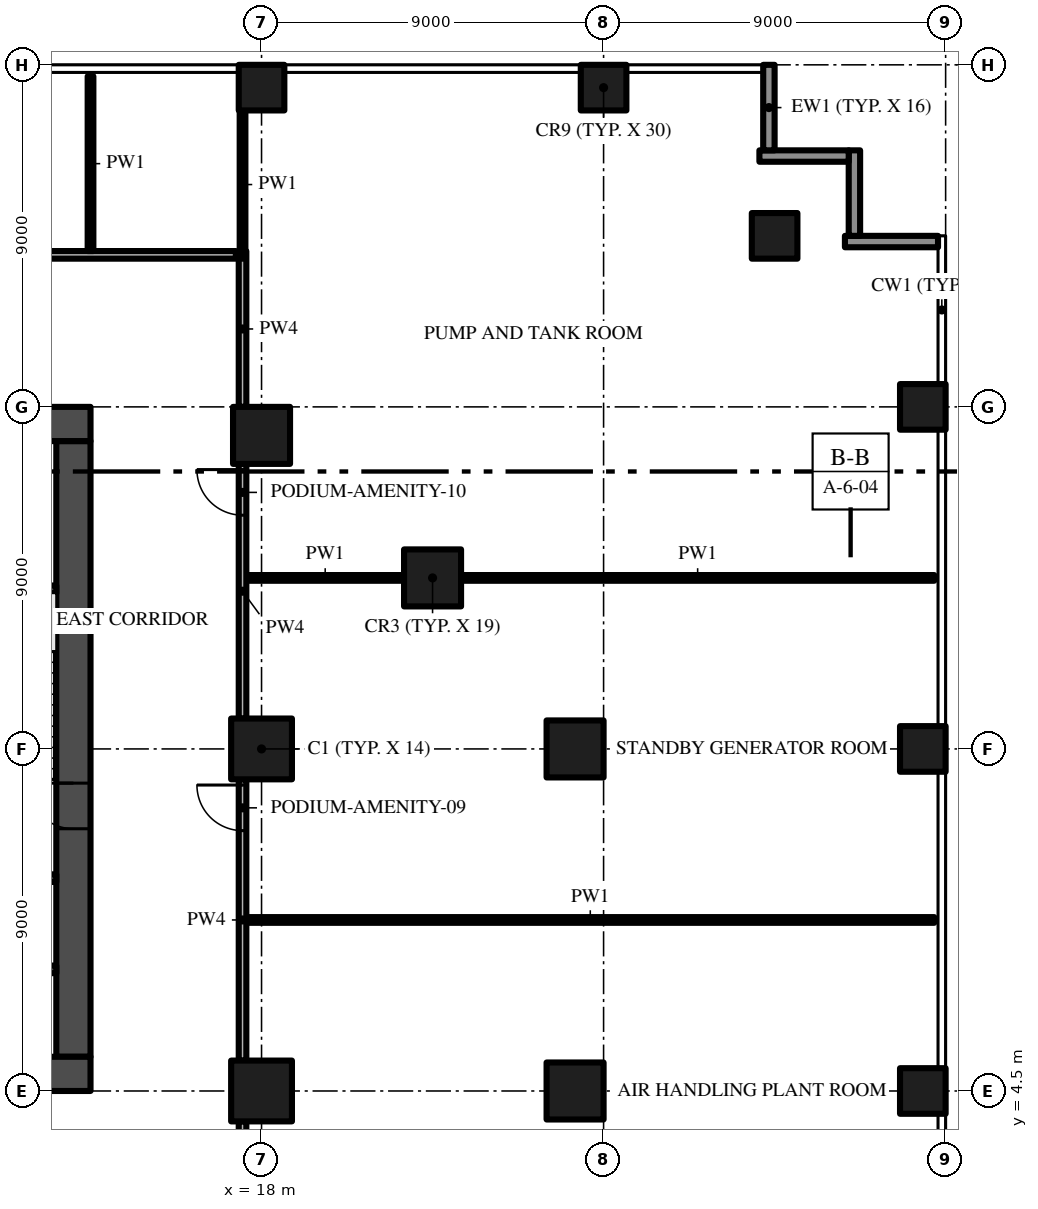
"""IFC4 building model, lengths in metres.
Left out: names, types, materials, properties, quantities, classifications, styles, units other than length and angle.
Written with IfcOpenShell. Run it as: python <this file> out.ifc"""

import sys

from ifc_helpers import new_model, si_unit, direction, frame, frame_2d, origin, origin_2d, place, context, subcontext, project, spatial, rectangle, extrude, element, fill, save


model = new_model("IFC4")
c1 = context("Model", 3, precision=1e-05, world=origin(), true_north=direction((0.0, 1.0)))
c2 = subcontext(c1, "Body", "Model", "MODEL_VIEW")
j1 = project(units=[si_unit("LENGTHUNIT", "METRE"), si_unit("PLANEANGLEUNIT", "RADIAN")], contexts=[c1])
p1 = place(None, origin())
s1 = spatial("IfcSite", under=j1, at=p1, CompositionType="ELEMENT")
p2 = place(p1, origin())
s2 = spatial("IfcBuilding", under=s1, at=p2, CompositionType="ELEMENT")
p3 = place(p2, frame((0.0, 0.0, 6.0)))
s3 = spatial("IfcBuildingStorey", under=s2, at=p3, CompositionType="ELEMENT", Elevation=6.0)
p4 = place(p3, frame((-13.5, 4.95, -0.4), z_axis=(0.0, 0.0, 1.0), x_axis=(1.0, 0.0, 0.0)))
e1 = element("IfcWall", 1, at=p4, inside=s3, PredefinedType="SHEAR", context=c2, shape_type="SweptSolid", body=[
    extrude(rectangle(XDim=27.0, YDim=0.9, at=frame_2d((13.5, 0.0))), origin(), (0.0, 0.0, 1.0), 4.55),
])
p5 = place(p4, frame((12.0, 0.0, 0.4)))
e2 = element("IfcOpeningElement", 2, at=p5, cuts=e1, PredefinedType="OPENING", context=c2, shape_type="SweptSolid", body=[
    extrude(rectangle(XDim=3.0, YDim=2.4, at=frame_2d((1.5, 1.2))), frame((0.0, 0.46, 0.0), z_axis=(0.0, -1.0, 0.0), x_axis=(1.0, 0.0, 0.0)), (0.0, 0.0, 1.0), 0.92),
])
p6 = place(p4, frame((4.9, 0.0, 0.4)))
e3 = element("IfcOpeningElement", 3, at=p6, cuts=e1, PredefinedType="OPENING", context=c2, shape_type="SweptSolid", body=[
    extrude(rectangle(XDim=1.2, YDim=2.2, at=frame_2d((0.6, 1.1))), frame((0.0, 0.46, 0.0), z_axis=(0.0, -1.0, 0.0), x_axis=(1.0, 0.0, 0.0)), (0.0, 0.0, 1.0), 0.92),
])
p7 = place(p4, frame((20.75, 0.0, 0.4)))
e4 = element("IfcOpeningElement", 4, at=p7, cuts=e1, PredefinedType="OPENING", context=c2, shape_type="SweptSolid", body=[
    extrude(rectangle(XDim=1.5, YDim=2.2, at=frame_2d((0.75, 1.1))), frame((0.0, 0.46, 0.0), z_axis=(0.0, -1.0, 0.0), x_axis=(1.0, 0.0, 0.0)), (0.0, 0.0, 1.0), 0.92),
])
p8 = place(p4, frame((17.4, 0.0, 0.4)))
e5 = element("IfcOpeningElement", 5, at=p8, cuts=e1, PredefinedType="OPENING", context=c2, shape_type="SweptSolid", body=[
    extrude(rectangle(XDim=1.2, YDim=2.2, at=frame_2d((0.6, 1.1))), frame((0.0, 0.46, 0.0), z_axis=(0.0, -1.0, 0.0), x_axis=(1.0, 0.0, 0.0)), (0.0, 0.0, 1.0), 0.92),
])
p9 = place(p3, frame((13.05, 5.4, -0.4), z_axis=(0.0, 0.0, 1.0), x_axis=(0.0, 1.0, 0.0)))
e6 = element("IfcWall", 6, at=p9, inside=s3, PredefinedType="SHEAR", context=c2, shape_type="SweptSolid", body=[
    extrude(rectangle(XDim=16.2, YDim=0.9, at=frame_2d((8.1, 0.0))), origin(), (0.0, 0.0, 1.0), 4.55),
])
p10 = place(p9, frame((6.0, 0.0, 0.4)))
e7 = element("IfcOpeningElement", 7, at=p10, cuts=e6, PredefinedType="OPENING", context=c2, shape_type="SweptSolid", body=[
    extrude(rectangle(XDim=1.2, YDim=2.2, at=frame_2d((0.6, 1.1))), frame((0.0, 0.46, 0.0), z_axis=(0.0, -1.0, 0.0), x_axis=(1.0, 0.0, 0.0)), (0.0, 0.0, 1.0), 0.92),
])
p11 = place(p3, frame((13.5, 22.05, -0.4), z_axis=(0.0, 0.0, 1.0), x_axis=(-1.0, 0.0, 0.0)))
e8 = element("IfcWall", 8, at=p11, inside=s3, PredefinedType="SHEAR", context=c2, shape_type="SweptSolid", body=[
    extrude(rectangle(XDim=27.0, YDim=0.9, at=frame_2d((13.5, 0.0))), origin(), (0.0, 0.0, 1.0), 4.55),
])
for number, where, z_axis, x_axis in (
    (9, (18.0, 30.9, 0.0), (0.0, 0.0, 1.0), (1.0, 0.0, 0.0)),
    (10, (27.0, 30.9, 0.0), (0.0, 0.0, 1.0), (1.0, 0.0, 0.0)),
    (11, (35.4, 13.5, 0.0), (0.0, 0.0, 1.0), (1.0, 0.0, 0.0)),
    (12, (35.4, 22.5, 0.0), (0.0, 0.0, 1.0), (1.0, 0.0, 0.0)),
    (13, (31.5, 27.0, 0.0), (0.0, 0.0, 1.0), (1.0, 0.0, 0.0)),
    (14, (35.4, 4.5, 0.0), (0.0, 0.0, 1.0), (1.0, 0.0, 0.0)),
):
    element("IfcColumn", number, at=place(p3, frame(where, z_axis=z_axis, x_axis=x_axis)), inside=s3, PredefinedType="COLUMN", context=c2, shape_type="SweptSolid", body=[
        extrude(rectangle(XDim=1.2, YDim=1.2, at=origin_2d()), origin(), (0.0, 0.0, 1.0), 4.15),
    ])
p12 = place(p3, frame((18.0, 13.5, 0.0), z_axis=(0.0, 0.0, 1.0), x_axis=(1.0, 0.0, 0.0)))
e15 = element("IfcColumn", 15, at=p12, inside=s3, PredefinedType="COLUMN", context=c2, shape_type="SweptSolid", body=[
    extrude(rectangle(XDim=1.6, YDim=1.6, at=origin_2d()), origin(), (0.0, 0.0, 1.0), 4.15),
])
p13 = place(p3, frame((18.0, 21.75, 0.0), z_axis=(0.0, 0.0, 1.0), x_axis=(1.0, 0.0, 0.0)))
e16 = element("IfcColumn", 16, at=p13, inside=s3, PredefinedType="COLUMN", context=c2, shape_type="SweptSolid", body=[
    extrude(rectangle(XDim=1.5, YDim=1.5, at=origin_2d()), origin(), (0.0, 0.0, 1.0), 4.15),
])
p14 = place(p3, frame((18.0, 4.5, 0.0), z_axis=(0.0, 0.0, 1.0), x_axis=(1.0, 0.0, 0.0)))
e17 = element("IfcColumn", 17, at=p14, inside=s3, PredefinedType="COLUMN", context=c2, shape_type="SweptSolid", body=[
    extrude(rectangle(XDim=1.6, YDim=1.6, at=origin_2d()), origin(), (0.0, 0.0, 1.0), 4.15),
])
for number, where, z_axis, x_axis in (
    (18, (26.25, 13.5, 0.0), (0.0, 0.0, 1.0), (1.0, 0.0, 0.0)),
    (19, (22.5, 18.0, 0.0), (0.0, 0.0, 1.0), (1.0, 0.0, 0.0)),
    (20, (26.25, 4.5, 0.0), (0.0, 0.0, 1.0), (1.0, 0.0, 0.0)),
):
    element("IfcColumn", number, at=place(p3, frame(where, z_axis=z_axis, x_axis=x_axis)), inside=s3, PredefinedType="COLUMN", context=c2, shape_type="SweptSolid", body=[
        extrude(rectangle(XDim=1.5, YDim=1.5, at=origin_2d()), origin(), (0.0, 0.0, 1.0), 4.15),
    ])
p15 = place(p3, frame((33.35, 26.85, 0.0), z_axis=(0.0, 0.0, 1.0), x_axis=(1.0, 0.0, 0.0)))
e21 = element("IfcWall", 21, at=p15, inside=s3, PredefinedType="SOLIDWALL", context=c2, shape_type="SweptSolid", body=[
    extrude(rectangle(XDim=2.45, YDim=0.3, at=frame_2d((1.225, 0.0))), origin(), (0.0, 0.0, 1.0), 4.15),
])
p16 = place(p3, frame((33.6, 29.25, 0.0), z_axis=(0.0, 0.0, 1.0), x_axis=(0.0, -1.0, 0.0)))
e22 = element("IfcWall", 22, at=p16, inside=s3, PredefinedType="SOLIDWALL", context=c2, shape_type="SweptSolid", body=[
    extrude(rectangle(XDim=2.25, YDim=0.3, at=frame_2d((1.125, 0.0))), origin(), (0.0, 0.0, 1.0), 4.15),
])
p17 = place(p3, frame((31.1, 29.1, 0.0), z_axis=(0.0, 0.0, 1.0), x_axis=(1.0, 0.0, 0.0)))
e23 = element("IfcWall", 23, at=p17, inside=s3, PredefinedType="SOLIDWALL", context=c2, shape_type="SweptSolid", body=[
    extrude(rectangle(XDim=2.35, YDim=0.3, at=frame_2d((1.175, 0.0))), origin(), (0.0, 0.0, 1.0), 4.15),
])
p18 = place(p3, frame((31.35, 31.5, 0.0), z_axis=(0.0, 0.0, 1.0), x_axis=(0.0, -1.0, 0.0)))
e24 = element("IfcWall", 24, at=p18, inside=s3, PredefinedType="SOLIDWALL", context=c2, shape_type="SweptSolid", body=[
    extrude(rectangle(XDim=2.25, YDim=0.3, at=frame_2d((1.125, 0.0))), origin(), (0.0, 0.0, 1.0), 4.15),
])
for number, where, z_axis, x_axis in (
    (25, (9.65, 7.7, 0.0), (0.0, 0.0, 1.0), (1.0, 0.0, 0.0)),
    (26, (9.65, 10.1, 0.0), (0.0, 0.0, 1.0), (1.0, 0.0, 0.0)),
    (27, (9.65, 17.7, 0.0), (0.0, 0.0, 1.0), (1.0, 0.0, 0.0)),
):
    element("IfcWall", number, at=place(p3, frame(where, z_axis=z_axis, x_axis=x_axis)), inside=s3, PredefinedType="SHEAR", context=c2, shape_type="SweptSolid", body=[
        extrude(rectangle(XDim=2.95, YDim=0.2, at=frame_2d((1.475, 0.0))), origin(), (0.0, 0.0, 1.0), 4.15),
    ])
p19 = place(p3, frame((17.6, 9.0, 0.0), z_axis=(0.0, 0.0, 1.0), x_axis=(1.0, 0.0, 0.0)))
e28 = element("IfcWall", 28, at=p19, inside=s3, PredefinedType="PARTITIONING", context=c2, shape_type="SweptSolid", body=[
    extrude(rectangle(XDim=18.1, YDim=0.15, at=frame_2d((9.05, 0.0))), origin(), (0.0, 0.0, 1.0), 4.15),
])
p20 = place(p3, frame((17.6, 18.0, 0.0), z_axis=(0.0, 0.0, 1.0), x_axis=(1.0, 0.0, 0.0)))
e29 = element("IfcWall", 29, at=p20, inside=s3, PredefinedType="PARTITIONING", context=c2, shape_type="SweptSolid", body=[
    extrude(rectangle(XDim=4.15, YDim=0.15, at=frame_2d((2.075, 0.0))), origin(), (0.0, 0.0, 1.0), 4.15),
])
p21 = place(p3, frame((23.25, 18.0, 0.0), z_axis=(0.0, 0.0, 1.0), x_axis=(1.0, 0.0, 0.0)))
e30 = element("IfcWall", 30, at=p21, inside=s3, PredefinedType="PARTITIONING", context=c2, shape_type="SweptSolid", body=[
    extrude(rectangle(XDim=12.45, YDim=0.15, at=frame_2d((6.225, 0.0))), origin(), (0.0, 0.0, 1.0), 4.15),
])
p22 = place(p3, frame((-17.325, 26.5, 0.0), z_axis=(0.0, 0.0, 1.0), x_axis=(1.0, 0.0, 0.0)))
e31 = element("IfcWall", 31, at=p22, inside=s3, PredefinedType="PARTITIONING", context=c2, shape_type="SweptSolid", body=[
    extrude(rectangle(XDim=34.65, YDim=0.2, at=frame_2d((17.325, 0.0))), origin(), (0.0, 0.0, 1.0), 4.15),
])
p23 = place(p22, frame((5.625, 0.0, 0.0)))
e32 = element("IfcOpeningElement", 32, at=p23, cuts=e31, PredefinedType="OPENING", context=c2, shape_type="SweptSolid", body=[
    extrude(rectangle(XDim=0.9, YDim=2.1, at=frame_2d((0.45, 1.05))), frame((0.0, 0.11, 0.0), z_axis=(0.0, -1.0, 0.0), x_axis=(1.0, 0.0, 0.0)), (0.0, 0.0, 1.0), 0.22),
])
p24 = place(p22, frame((10.125, 0.0, 0.0)))
e33 = element("IfcOpeningElement", 33, at=p24, cuts=e31, PredefinedType="OPENING", context=c2, shape_type="SweptSolid", body=[
    extrude(rectangle(XDim=0.9, YDim=2.1, at=frame_2d((0.45, 1.05))), frame((0.0, 0.11, 0.0), z_axis=(0.0, -1.0, 0.0), x_axis=(1.0, 0.0, 0.0)), (0.0, 0.0, 1.0), 0.22),
])
p25 = place(p22, frame((14.625, 0.0, 0.0)))
e34 = element("IfcOpeningElement", 34, at=p25, cuts=e31, PredefinedType="OPENING", context=c2, shape_type="SweptSolid", body=[
    extrude(rectangle(XDim=0.9, YDim=2.1, at=frame_2d((0.45, 1.05))), frame((0.0, 0.11, 0.0), z_axis=(0.0, -1.0, 0.0), x_axis=(1.0, 0.0, 0.0)), (0.0, 0.0, 1.0), 0.22),
])
p26 = place(p22, frame((23.625, 0.0, 0.0)))
e35 = element("IfcOpeningElement", 35, at=p26, cuts=e31, PredefinedType="OPENING", context=c2, shape_type="SweptSolid", body=[
    extrude(rectangle(XDim=0.9, YDim=2.1, at=frame_2d((0.45, 1.05))), frame((0.0, 0.11, 0.0), z_axis=(0.0, -1.0, 0.0), x_axis=(1.0, 0.0, 0.0)), (0.0, 0.0, 1.0), 0.22),
])
p27 = place(p3, frame((13.5, 26.6, 0.0), z_axis=(0.0, 0.0, 1.0), x_axis=(0.0, 1.0, 0.0)))
e36 = element("IfcWall", 36, at=p27, inside=s3, PredefinedType="PARTITIONING", context=c2, shape_type="SweptSolid", body=[
    extrude(rectangle(XDim=4.6, YDim=0.15, at=frame_2d((2.3, 0.0))), origin(), (0.0, 0.0, 1.0), 4.15),
])
p28 = place(p3, frame((17.5, -0.175, 0.0), z_axis=(0.0, 0.0, 1.0), x_axis=(0.0, 1.0, 0.0)))
e37 = element("IfcWall", 37, at=p28, inside=s3, PredefinedType="PARTITIONING", context=c2, shape_type="SweptSolid", body=[
    extrude(rectangle(XDim=3.875, YDim=0.2, at=frame_2d((1.938, 0.0))), origin(), (0.0, 0.0, 1.0), 4.15),
])
p29 = place(p28, frame((1.825, 0.0, 0.0)))
e38 = element("IfcOpeningElement", 38, at=p29, cuts=e37, PredefinedType="OPENING", context=c2, shape_type="SweptSolid", body=[
    extrude(rectangle(XDim=1.2, YDim=2.4, at=frame_2d((0.6, 1.2))), frame((0.0, 0.11, 0.0), z_axis=(0.0, -1.0, 0.0), x_axis=(1.0, 0.0, 0.0)), (0.0, 0.0, 1.0), 0.22),
])
p30 = place(p3, frame((17.5, 5.3, 0.0), z_axis=(0.0, 0.0, 1.0), x_axis=(0.0, 1.0, 0.0)))
e39 = element("IfcWall", 39, at=p30, inside=s3, PredefinedType="PARTITIONING", context=c2, shape_type="SweptSolid", body=[
    extrude(rectangle(XDim=7.4, YDim=0.2, at=frame_2d((3.7, 0.0))), origin(), (0.0, 0.0, 1.0), 4.15),
])
p31 = place(p30, frame((6.05, 0.0, 0.0)))
e40 = element("IfcOpeningElement", 40, at=p31, cuts=e39, PredefinedType="OPENING", context=c2, shape_type="SweptSolid", body=[
    extrude(rectangle(XDim=1.2, YDim=2.4, at=frame_2d((0.6, 1.2))), frame((0.0, 0.11, 0.0), z_axis=(0.0, -1.0, 0.0), x_axis=(1.0, 0.0, 0.0)), (0.0, 0.0, 1.0), 0.22),
])
p32 = place(p3, frame((17.5, 14.3, 0.0), z_axis=(0.0, 0.0, 1.0), x_axis=(0.0, 1.0, 0.0)))
e41 = element("IfcWall", 41, at=p32, inside=s3, PredefinedType="PARTITIONING", context=c2, shape_type="SweptSolid", body=[
    extrude(rectangle(XDim=6.7, YDim=0.2, at=frame_2d((3.35, 0.0))), origin(), (0.0, 0.0, 1.0), 4.15),
])
p33 = place(p32, frame((5.35, 0.0, 0.0)))
e42 = element("IfcOpeningElement", 42, at=p33, cuts=e41, PredefinedType="OPENING", context=c2, shape_type="SweptSolid", body=[
    extrude(rectangle(XDim=1.2, YDim=2.4, at=frame_2d((0.6, 1.2))), frame((0.0, 0.11, 0.0), z_axis=(0.0, -1.0, 0.0), x_axis=(1.0, 0.0, 0.0)), (0.0, 0.0, 1.0), 0.22),
])
p34 = place(p3, frame((17.5, 22.5, 0.0), z_axis=(0.0, 0.0, 1.0), x_axis=(0.0, 1.0, 0.0)))
e43 = element("IfcWall", 43, at=p34, inside=s3, PredefinedType="PARTITIONING", context=c2, shape_type="SweptSolid", body=[
    extrude(rectangle(XDim=4.1, YDim=0.2, at=frame_2d((2.05, 0.0))), origin(), (0.0, 0.0, 1.0), 4.15),
])
p35 = place(p3, frame((17.5, 26.4, 0.0), z_axis=(0.0, 0.0, 1.0), x_axis=(0.0, 1.0, 0.0)))
e44 = element("IfcWall", 44, at=p35, inside=s3, PredefinedType="PARTITIONING", context=c2, shape_type="SweptSolid", body=[
    extrude(rectangle(XDim=3.9, YDim=0.15, at=frame_2d((1.95, 0.0))), origin(), (0.0, 0.0, 1.0), 4.15),
])
p36 = place(p10, frame((1.2, 0.0, 0.0), z_axis=(0.0, 0.0, 1.0), x_axis=(-1.0, 0.0, 0.0)))
e45 = element("IfcDoor", 45, at=p36, inside=s3, OperationType="SINGLE_SWING_LEFT", PredefinedType="DOOR", context=c2, shape_type="SweptSolid", body=[
    extrude(rectangle(XDim=1.2, YDim=2.2, at=frame_2d((0.6, 1.1))), frame((0.0, 0.025, 0.0), z_axis=(0.0, -1.0, 0.0), x_axis=(1.0, 0.0, 0.0)), (0.0, 0.0, 1.0), 0.05),
])
fill(e7, e45)
p37 = place(p31, origin())
e46 = element("IfcDoor", 46, at=p37, inside=s3, OperationType="SINGLE_SWING_RIGHT", PredefinedType="DOOR", context=c2, shape_type="SweptSolid", body=[
    extrude(rectangle(XDim=1.2, YDim=2.4, at=frame_2d((0.6, 1.2))), frame((0.0, 0.025, 0.0), z_axis=(0.0, -1.0, 0.0), x_axis=(1.0, 0.0, 0.0)), (0.0, 0.0, 1.0), 0.05),
])
fill(e40, e46)
p38 = place(p33, origin())
e47 = element("IfcDoor", 47, at=p38, inside=s3, OperationType="SINGLE_SWING_RIGHT", PredefinedType="DOOR", context=c2, shape_type="SweptSolid", body=[
    extrude(rectangle(XDim=1.2, YDim=2.4, at=frame_2d((0.6, 1.2))), frame((0.0, 0.025, 0.0), z_axis=(0.0, -1.0, 0.0), x_axis=(1.0, 0.0, 0.0)), (0.0, 0.0, 1.0), 0.05),
])
fill(e42, e47)
save(model, sys.argv[1])
